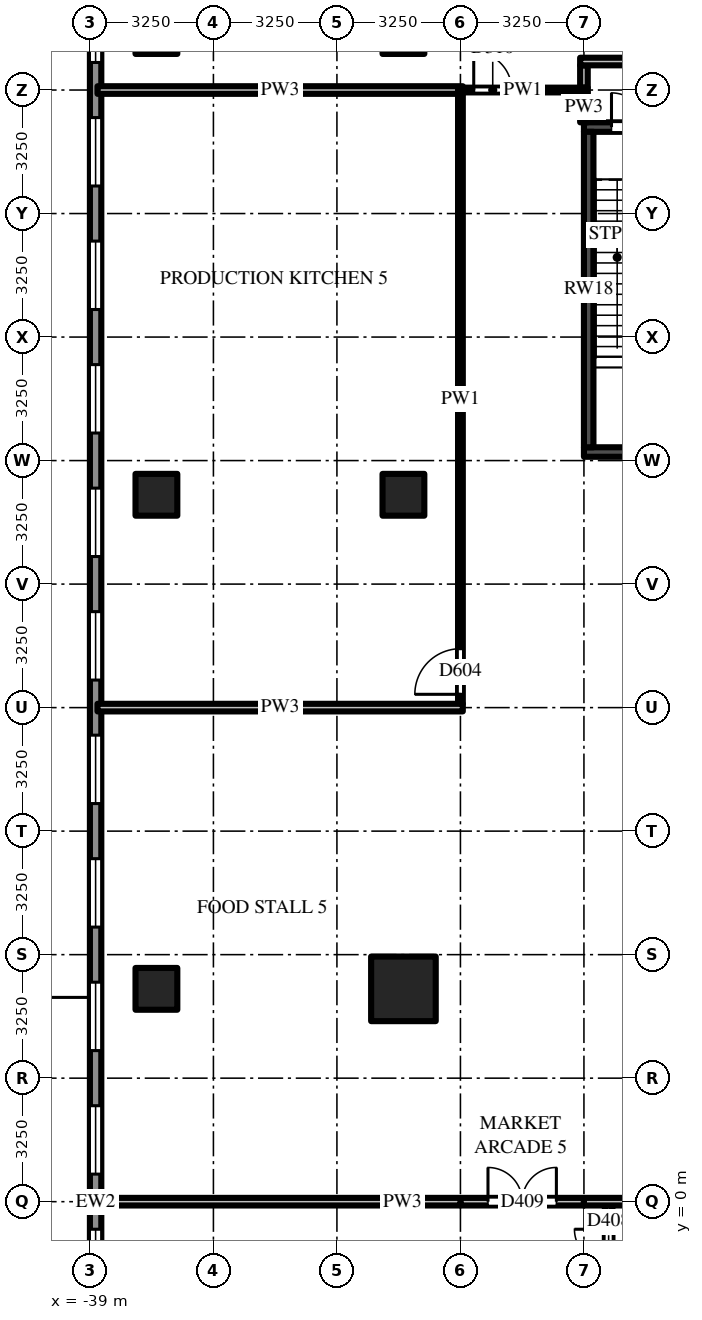
"""IFC4 building model, lengths in metres.
Left out: names, types, materials, properties, quantities, classifications, styles, units other than length and angle.
Written with IfcOpenShell. Run it as: python <this file> out.ifc"""

import sys

from ifc_helpers import new_model, si_unit, direction, frame, frame_2d, origin, origin_2d, place, context, subcontext, project, spatial, rectangle, extrude, source, transform, mapped, element, fill, save


model = new_model("IFC4")
c1 = context("Model", 3, precision=1e-05, world=origin(), true_north=direction((0.0, 1.0)))
c2 = subcontext(c1, "Body", "Model", "MODEL_VIEW")
j1 = project(units=[si_unit("LENGTHUNIT", "METRE"), si_unit("PLANEANGLEUNIT", "RADIAN")], contexts=[c1])
p1 = place(None, origin())
s1 = spatial("IfcSite", under=j1, at=p1, CompositionType="ELEMENT")
p2 = place(p1, origin())
s2 = spatial("IfcBuilding", under=s1, at=p2, CompositionType="ELEMENT")
p3 = place(p2, frame((0.0, 0.0, 14.0)))
s3 = spatial("IfcBuildingStorey", under=s2, at=p3, CompositionType="ELEMENT", Elevation=14.0)
m1 = source(origin(), c2, "Body", "SweptSolid", [
    extrude(rectangle(XDim=1.7, YDim=1.7, at=origin_2d()), origin(), (0.0, 0.0, 1.0), 5.0),
])
p4 = place(p3, frame((-30.75, 5.6, 0.0), z_axis=(0.0, 0.0, 1.0), x_axis=(1.0, 0.0, 0.0)))
e1 = element("IfcColumn", 1, at=p4, inside=s3, PredefinedType="COLUMN", context=c2, shape_type="MappedRepresentation", body=[
    mapped(m1, transform((0.0, 0.0, 0.0))),
])
m2 = source(origin(), c2, "Body", "SweptSolid", [
    extrude(rectangle(XDim=1.1, YDim=1.1, at=origin_2d()), origin(), (0.0, 0.0, 1.0), 5.0),
])
for number, where, z_axis, x_axis in (
    (2, (-30.75, 18.6, 0.0), (0.0, 0.0, 1.0), (1.0, 0.0, 0.0)),
    (3, (-30.75, 30.75, 0.0), (0.0, 0.0, 1.0), (1.0, 0.0, 0.0)),
    (4, (-37.25, 5.6, 0.0), (0.0, 0.0, 1.0), (1.0, 0.0, 0.0)),
    (5, (-37.25, 18.6, 0.0), (0.0, 0.0, 1.0), (1.0, 0.0, 0.0)),
    (6, (-37.25, 30.75, 0.0), (0.0, 0.0, 1.0), (1.0, 0.0, 0.0)),
):
    element("IfcColumn", number, at=place(p3, frame(where, z_axis=z_axis, x_axis=x_axis)), inside=s3, PredefinedType="COLUMN", context=c2, shape_type="MappedRepresentation", body=[
        mapped(m2, transform((0.0, 0.0, 0.0))),
    ])
m3 = source(origin(), c2, "Body", "SweptSolid", [
    extrude(rectangle(XDim=6.5, YDim=0.25, at=frame_2d((3.25, 0.0))), origin(), (0.0, 0.0, 1.0), 4.7),
])
p5 = place(p3, frame((-26.0, 28.275, 0.0), z_axis=(0.0, 0.0, 1.0), x_axis=(1.0, 0.0, 0.0)))
e7 = element("IfcWall", 7, at=p5, inside=s3, PredefinedType="SHEAR", context=c2, shape_type="MappedRepresentation", body=[
    mapped(m3, transform((0.0, 0.0, 0.0))),
])
m4 = source(origin(), c2, "Body", "SweptSolid", [
    extrude(rectangle(XDim=1.8, YDim=2.1, at=frame_2d((0.9, 1.05))), frame((0.0, 0.135, 0.0), z_axis=(0.0, -1.0, 0.0), x_axis=(1.0, 0.0, 0.0)), (0.0, 0.0, 1.0), 0.27),
])
p6 = place(p5, frame((0.725, 0.0, 0.0)))
e8 = element("IfcOpeningElement", 8, at=p6, cuts=e7, PredefinedType="OPENING", context=c2, shape_type="MappedRepresentation", body=[
    mapped(m4, transform((0.0, 0.0, 0.0))),
])
p7 = place(p5, frame((3.975, 0.0, 0.0)))
e9 = element("IfcOpeningElement", 9, at=p7, cuts=e7, PredefinedType="OPENING", context=c2, shape_type="MappedRepresentation", body=[
    mapped(m4, transform((0.0, 0.0, 0.0))),
])
p8 = place(p3, frame((-26.0, 19.725, 0.0), z_axis=(0.0, 0.0, 1.0), x_axis=(1.0, 0.0, 0.0)))
e10 = element("IfcWall", 10, at=p8, inside=s3, PredefinedType="SHEAR", context=c2, shape_type="MappedRepresentation", body=[
    mapped(m3, transform((0.0, 0.0, 0.0))),
])
m5 = source(origin(), c2, "Body", "SweptSolid", [
    extrude(rectangle(XDim=8.3, YDim=0.25, at=frame_2d((4.15, 0.0))), origin(), (0.0, 0.0, 1.0), 4.7),
])
p9 = place(p3, frame((-25.875, 19.85, 0.0), z_axis=(0.0, 0.0, 1.0), x_axis=(0.0, 1.0, 0.0)))
e11 = element("IfcWall", 11, at=p9, inside=s3, PredefinedType="SHEAR", context=c2, shape_type="MappedRepresentation", body=[
    mapped(m5, transform((0.0, 0.0, 0.0))),
])
m6 = source(origin(), c2, "Body", "SweptSolid", [
    extrude(rectangle(XDim=71.5, YDim=0.3, at=frame_2d((35.75, 0.0))), origin(), (0.0, 0.0, 1.0), 4.7),
])
p10 = place(p3, frame((-38.85, 35.75, 0.0), z_axis=(0.0, 0.0, 1.0), x_axis=(0.0, -1.0, 0.0)))
e12 = element("IfcWall", 12, at=p10, inside=s3, PredefinedType="SOLIDWALL", context=c2, shape_type="MappedRepresentation", body=[
    mapped(m6, transform((0.0, 0.0, 0.0))),
])
m7 = source(origin(), c2, "Body", "SweptSolid", [
    extrude(rectangle(XDim=1.8, YDim=3.0, at=frame_2d((0.9, 1.5))), frame((0.0, 0.16, 0.0), z_axis=(0.0, -1.0, 0.0), x_axis=(1.0, 0.0, 0.0)), (0.0, 0.0, 1.0), 0.32),
])
p11 = place(p10, frame((0.725, 0.0, 0.9)))
e13 = element("IfcOpeningElement", 13, at=p11, cuts=e12, PredefinedType="OPENING", context=c2, shape_type="MappedRepresentation", body=[
    mapped(m7, transform((0.0, 0.0, 0.0))),
])
p12 = place(p10, frame((3.975, 0.0, 0.9)))
e14 = element("IfcOpeningElement", 14, at=p12, cuts=e12, PredefinedType="OPENING", context=c2, shape_type="MappedRepresentation", body=[
    mapped(m7, transform((0.0, 0.0, 0.0))),
])
p13 = place(p10, frame((7.225, 0.0, 0.9)))
e15 = element("IfcOpeningElement", 15, at=p13, cuts=e12, PredefinedType="OPENING", context=c2, shape_type="MappedRepresentation", body=[
    mapped(m7, transform((0.0, 0.0, 0.0))),
])
p14 = place(p10, frame((10.475, 0.0, 0.9)))
e16 = element("IfcOpeningElement", 16, at=p14, cuts=e12, PredefinedType="OPENING", context=c2, shape_type="MappedRepresentation", body=[
    mapped(m7, transform((0.0, 0.0, 0.0))),
])
p15 = place(p10, frame((13.725, 0.0, 0.9)))
e17 = element("IfcOpeningElement", 17, at=p15, cuts=e12, PredefinedType="OPENING", context=c2, shape_type="MappedRepresentation", body=[
    mapped(m7, transform((0.0, 0.0, 0.0))),
])
p16 = place(p10, frame((16.975, 0.0, 0.9)))
e18 = element("IfcOpeningElement", 18, at=p16, cuts=e12, PredefinedType="OPENING", context=c2, shape_type="MappedRepresentation", body=[
    mapped(m7, transform((0.0, 0.0, 0.0))),
])
p17 = place(p10, frame((20.225, 0.0, 0.9)))
e19 = element("IfcOpeningElement", 19, at=p17, cuts=e12, PredefinedType="OPENING", context=c2, shape_type="MappedRepresentation", body=[
    mapped(m7, transform((0.0, 0.0, 0.0))),
])
p18 = place(p10, frame((23.475, 0.0, 0.9)))
e20 = element("IfcOpeningElement", 20, at=p18, cuts=e12, PredefinedType="OPENING", context=c2, shape_type="MappedRepresentation", body=[
    mapped(m7, transform((0.0, 0.0, 0.0))),
])
p19 = place(p10, frame((26.725, 0.0, 0.9)))
e21 = element("IfcOpeningElement", 21, at=p19, cuts=e12, PredefinedType="OPENING", context=c2, shape_type="MappedRepresentation", body=[
    mapped(m7, transform((0.0, 0.0, 0.0))),
])
p20 = place(p10, frame((29.975, 0.0, 0.9)))
e22 = element("IfcOpeningElement", 22, at=p20, cuts=e12, PredefinedType="OPENING", context=c2, shape_type="MappedRepresentation", body=[
    mapped(m7, transform((0.0, 0.0, 0.0))),
])
p21 = place(p10, frame((33.225, 0.0, 0.9)))
e23 = element("IfcOpeningElement", 23, at=p21, cuts=e12, PredefinedType="OPENING", context=c2, shape_type="MappedRepresentation", body=[
    mapped(m7, transform((0.0, 0.0, 0.0))),
])
p22 = place(p10, frame((36.475, 0.0, 0.9)))
e24 = element("IfcOpeningElement", 24, at=p22, cuts=e12, PredefinedType="OPENING", context=c2, shape_type="MappedRepresentation", body=[
    mapped(m7, transform((0.0, 0.0, 0.0))),
])
p23 = place(p10, frame((39.725, 0.0, 0.9)))
e25 = element("IfcOpeningElement", 25, at=p23, cuts=e12, PredefinedType="OPENING", context=c2, shape_type="MappedRepresentation", body=[
    mapped(m7, transform((0.0, 0.0, 0.0))),
])
p24 = place(p10, frame((42.975, 0.0, 0.9)))
e26 = element("IfcOpeningElement", 26, at=p24, cuts=e12, PredefinedType="OPENING", context=c2, shape_type="MappedRepresentation", body=[
    mapped(m7, transform((0.0, 0.0, 0.0))),
])
p25 = place(p10, frame((46.225, 0.0, 0.9)))
e27 = element("IfcOpeningElement", 27, at=p25, cuts=e12, PredefinedType="OPENING", context=c2, shape_type="MappedRepresentation", body=[
    mapped(m7, transform((0.0, 0.0, 0.0))),
])
m8 = source(origin(), c2, "Body", "SweptSolid", [
    extrude(rectangle(XDim=1.8, YDim=2.4, at=frame_2d((0.9, 1.2))), frame((0.0, 0.16, 0.0), z_axis=(0.0, -1.0, 0.0), x_axis=(1.0, 0.0, 0.0)), (0.0, 0.0, 1.0), 0.32),
])
p26 = place(p10, frame((49.475, 0.0, 0.0)))
e28 = element("IfcOpeningElement", 28, at=p26, cuts=e12, PredefinedType="OPENING", context=c2, shape_type="MappedRepresentation", body=[
    mapped(m8, transform((0.0, 0.0, 0.0))),
])
p27 = place(p10, frame((52.725, 0.0, 0.9)))
e29 = element("IfcOpeningElement", 29, at=p27, cuts=e12, PredefinedType="OPENING", context=c2, shape_type="MappedRepresentation", body=[
    mapped(m7, transform((0.0, 0.0, 0.0))),
])
p28 = place(p10, frame((55.975, 0.0, 0.9)))
e30 = element("IfcOpeningElement", 30, at=p28, cuts=e12, PredefinedType="OPENING", context=c2, shape_type="MappedRepresentation", body=[
    mapped(m7, transform((0.0, 0.0, 0.0))),
])
p29 = place(p10, frame((59.225, 0.0, 0.9)))
e31 = element("IfcOpeningElement", 31, at=p29, cuts=e12, PredefinedType="OPENING", context=c2, shape_type="MappedRepresentation", body=[
    mapped(m7, transform((0.0, 0.0, 0.0))),
])
p30 = place(p10, frame((62.475, 0.0, 0.9)))
e32 = element("IfcOpeningElement", 32, at=p30, cuts=e12, PredefinedType="OPENING", context=c2, shape_type="MappedRepresentation", body=[
    mapped(m7, transform((0.0, 0.0, 0.0))),
])
p31 = place(p10, frame((65.725, 0.0, 0.9)))
e33 = element("IfcOpeningElement", 33, at=p31, cuts=e12, PredefinedType="OPENING", context=c2, shape_type="MappedRepresentation", body=[
    mapped(m7, transform((0.0, 0.0, 0.0))),
])
p32 = place(p10, frame((68.975, 0.0, 0.9)))
e34 = element("IfcOpeningElement", 34, at=p32, cuts=e12, PredefinedType="OPENING", context=c2, shape_type="MappedRepresentation", body=[
    mapped(m7, transform((0.0, 0.0, 0.0))),
])
p33 = place(p3, frame((-29.25, 13.1, 0.0), z_axis=(0.0, 0.0, 1.0), x_axis=(0.0, 1.0, 0.0)))
e35 = element("IfcWall", 35, at=p33, inside=s3, PredefinedType="PARTITIONING", context=c2, shape_type="SweptSolid", body=[
    extrude(rectangle(XDim=16.05, YDim=0.125, at=frame_2d((8.025, 0.0))), origin(), (0.0, 0.0, 1.0), 3.762),
])
m9 = source(origin(), c2, "Body", "SweptSolid", [
    extrude(rectangle(XDim=1.2, YDim=2.1, at=frame_2d((0.6, 1.05))), frame((0.0, 0.073, 0.0), z_axis=(0.0, -1.0, 0.0), x_axis=(1.0, 0.0, 0.0)), (0.0, 0.0, 1.0), 0.145),
])
p34 = place(p33, frame((0.25, 0.0, 0.0)))
e36 = element("IfcOpeningElement", 36, at=p34, cuts=e35, PredefinedType="OPENING", context=c2, shape_type="MappedRepresentation", body=[
    mapped(m9, transform((0.0, 0.0, 0.0))),
])
m10 = source(origin(), c2, "Body", "SweptSolid", [
    extrude(rectangle(XDim=0.788, YDim=0.2, at=frame_2d((0.394, 0.0))), origin(), (0.0, 0.0, 1.0), 4.7),
])
p35 = place(p3, frame((-26.0, 28.4, 0.0), z_axis=(0.0, 0.0, 1.0), x_axis=(0.0, 1.0, 0.0)))
e37 = element("IfcWall", 37, at=p35, inside=s3, PredefinedType="PARTITIONING", context=c2, shape_type="MappedRepresentation", body=[
    mapped(m10, transform((0.0, 0.0, 0.0))),
])
m11 = source(origin(), c2, "Body", "SweptSolid", [
    extrude(rectangle(XDim=0.587, YDim=0.2, at=frame_2d((0.294, 0.0))), origin(), (0.0, 0.0, 1.0), 4.7),
])
p36 = place(p3, frame((-26.0, 29.312, 0.0), z_axis=(0.0, 0.0, 1.0), x_axis=(0.0, 1.0, 0.0)))
e38 = element("IfcWall", 38, at=p36, inside=s3, PredefinedType="PARTITIONING", context=c2, shape_type="MappedRepresentation", body=[
    mapped(m11, transform((0.0, 0.0, 0.0))),
])
m12 = source(origin(), c2, "Body", "SweptSolid", [
    extrude(rectangle(XDim=3.05, YDim=0.2, at=frame_2d((1.525, 0.0))), origin(), (0.0, 0.0, 1.0), 4.077),
])
p37 = place(p3, frame((-25.35, -3.15, 0.0), z_axis=(0.0, 0.0, 1.0), x_axis=(0.0, 1.0, 0.0)))
e39 = element("IfcWall", 39, at=p37, inside=s3, PredefinedType="PARTITIONING", context=c2, shape_type="MappedRepresentation", body=[
    mapped(m12, transform((0.0, 0.0, 0.0))),
])
m13 = source(origin(), c2, "Body", "SweptSolid", [
    extrude(rectangle(XDim=1.8, YDim=2.1, at=frame_2d((0.9, 1.05))), frame((0.0, 0.11, 0.0), z_axis=(0.0, -1.0, 0.0), x_axis=(1.0, 0.0, 0.0)), (0.0, 0.0, 1.0), 0.22),
])
p38 = place(p37, frame((0.625, 0.0, 0.0)))
e40 = element("IfcOpeningElement", 40, at=p38, cuts=e39, PredefinedType="OPENING", context=c2, shape_type="MappedRepresentation", body=[
    mapped(m13, transform((0.0, 0.0, 0.0))),
])
m14 = source(origin(), c2, "Body", "SweptSolid", [
    extrude(rectangle(XDim=3.25, YDim=0.2, at=frame_2d((1.625, 0.0))), origin(), (0.0, 0.0, 1.0), 4.077),
])
p39 = place(p3, frame((-29.25, 0.0, 0.0), z_axis=(0.0, 0.0, 1.0), x_axis=(1.0, 0.0, 0.0)))
e41 = element("IfcWall", 41, at=p39, inside=s3, PredefinedType="PARTITIONING", context=c2, shape_type="MappedRepresentation", body=[
    mapped(m14, transform((0.0, 0.0, 0.0))),
])
p40 = place(p39, frame((0.725, 0.0, 0.0)))
e42 = element("IfcOpeningElement", 42, at=p40, cuts=e41, PredefinedType="OPENING", context=c2, shape_type="MappedRepresentation", body=[
    mapped(m13, transform((0.0, 0.0, 0.0))),
])
m15 = source(origin(), c2, "Body", "SweptSolid", [
    extrude(rectangle(XDim=9.55, YDim=0.2, at=frame_2d((4.775, 0.0))), origin(), (0.0, 0.0, 1.0), 3.918),
])
p41 = place(p3, frame((-38.8, 0.0, 0.0), z_axis=(0.0, 0.0, 1.0), x_axis=(1.0, 0.0, 0.0)))
e43 = element("IfcWall", 43, at=p41, inside=s3, PredefinedType="PARTITIONING", context=c2, shape_type="MappedRepresentation", body=[
    mapped(m15, transform((0.0, 0.0, 0.0))),
])
m16 = source(origin(), c2, "Body", "SweptSolid", [
    extrude(rectangle(XDim=2.0, YDim=0.2, at=frame_2d((1.0, 0.0))), origin(), (0.0, 0.0, 1.0), 4.077),
])
p42 = place(p3, frame((-26.0, 0.0, 0.0), z_axis=(0.0, 0.0, 1.0), x_axis=(1.0, 0.0, 0.0)))
e44 = element("IfcWall", 44, at=p42, inside=s3, PredefinedType="PARTITIONING", context=c2, shape_type="MappedRepresentation", body=[
    mapped(m16, transform((0.0, 0.0, 0.0))),
])
m17 = source(origin(), c2, "Body", "SweptSolid", [
    extrude(rectangle(XDim=9.613, YDim=0.2, at=frame_2d((4.806, 0.0))), origin(), (0.0, 0.0, 1.0), 3.762),
])
for number, where, z_axis, x_axis in (
    (45, (-38.8, 13.0, 0.0), (0.0, 0.0, 1.0), (1.0, 0.0, 0.0)),
    (46, (-38.8, 29.25, 0.0), (0.0, 0.0, 1.0), (1.0, 0.0, 0.0)),
):
    element("IfcWall", number, at=place(p3, frame(where, z_axis=z_axis, x_axis=x_axis)), inside=s3, PredefinedType="PARTITIONING", context=c2, shape_type="MappedRepresentation", body=[
        mapped(m17, transform((0.0, 0.0, 0.0))),
    ])
m18 = source(origin(), c2, "Body", "SweptSolid", [
    extrude(rectangle(XDim=3.413, YDim=0.125, at=frame_2d((1.706, 0.0))), origin(), (0.0, 0.0, 1.0), 4.7),
])
p43 = place(p3, frame((-29.312, 29.25, 0.0), z_axis=(0.0, 0.0, 1.0), x_axis=(1.0, 0.0, 0.0)))
e47 = element("IfcWall", 47, at=p43, inside=s3, PredefinedType="PARTITIONING", context=c2, shape_type="MappedRepresentation", body=[
    mapped(m18, transform((0.0, 0.0, 0.0))),
])
m19 = source(origin(), c2, "Body", "SweptSolid", [
    extrude(rectangle(XDim=1.0, YDim=2.1, at=frame_2d((0.5, 1.05))), frame((0.0, 0.073, 0.0), z_axis=(0.0, -1.0, 0.0), x_axis=(1.0, 0.0, 0.0)), (0.0, 0.0, 1.0), 0.145),
])
p44 = place(p43, frame((0.413, 0.0, 0.0)))
e48 = element("IfcOpeningElement", 48, at=p44, cuts=e47, PredefinedType="OPENING", context=c2, shape_type="MappedRepresentation", body=[
    mapped(m19, transform((0.0, 0.0, 0.0))),
])
m20 = source(origin(), c2, "Body", "SweptSolid", [
    extrude(rectangle(XDim=8.2, YDim=0.2, at=frame_2d((4.1, 0.0))), origin(), (0.0, 0.0, 1.0), 3.762),
])
p45 = place(p3, frame((-26.1, 30.0, 0.0), z_axis=(0.0, 0.0, 1.0), x_axis=(1.0, 0.0, 0.0)))
e49 = element("IfcWall", 49, at=p45, inside=s3, PredefinedType="PARTITIONING", context=c2, shape_type="MappedRepresentation", body=[
    mapped(m20, transform((0.0, 0.0, 0.0))),
])
m21 = source(origin(), c2, "Body", "SweptSolid", [
    extrude(rectangle(XDim=1.8, YDim=2.1, at=frame_2d((0.9, 1.05))), frame((0.0, 0.025, 0.0), z_axis=(0.0, -1.0, 0.0), x_axis=(1.0, 0.0, 0.0)), (0.0, 0.0, 1.0), 0.05),
])
p46 = place(p6, origin())
e50 = element("IfcDoor", 50, at=p46, inside=s3, OperationType="DOUBLE_DOOR_SINGLE_SWING", PredefinedType="DOOR", context=c2, shape_type="MappedRepresentation", body=[
    mapped(m21, transform((0.0, 0.0, 0.0))),
])
fill(e8, e50)
m22 = source(origin(), c2, "Body", "SweptSolid", [
    extrude(rectangle(XDim=1.8, YDim=3.0, at=frame_2d((0.9, 1.5))), frame((0.0, 0.03, 0.0), z_axis=(0.0, -1.0, 0.0), x_axis=(1.0, 0.0, 0.0)), (0.0, 0.0, 1.0), 0.06),
])
p47 = place(p12, origin())
e51 = element("IfcWindow", 51, at=p47, inside=s3, PartitioningType="SINGLE_PANEL", PredefinedType="WINDOW", context=c2, shape_type="MappedRepresentation", body=[
    mapped(m22, transform((0.0, 0.0, 0.0))),
])
fill(e14, e51)
p48 = place(p13, origin())
e52 = element("IfcWindow", 52, at=p48, inside=s3, PartitioningType="SINGLE_PANEL", PredefinedType="WINDOW", context=c2, shape_type="MappedRepresentation", body=[
    mapped(m22, transform((0.0, 0.0, 0.0))),
])
fill(e15, e52)
p49 = place(p14, origin())
e53 = element("IfcWindow", 53, at=p49, inside=s3, PartitioningType="SINGLE_PANEL", PredefinedType="WINDOW", context=c2, shape_type="MappedRepresentation", body=[
    mapped(m22, transform((0.0, 0.0, 0.0))),
])
fill(e16, e53)
p50 = place(p15, origin())
e54 = element("IfcWindow", 54, at=p50, inside=s3, PartitioningType="SINGLE_PANEL", PredefinedType="WINDOW", context=c2, shape_type="MappedRepresentation", body=[
    mapped(m22, transform((0.0, 0.0, 0.0))),
])
fill(e17, e54)
p51 = place(p16, origin())
e55 = element("IfcWindow", 55, at=p51, inside=s3, PartitioningType="SINGLE_PANEL", PredefinedType="WINDOW", context=c2, shape_type="MappedRepresentation", body=[
    mapped(m22, transform((0.0, 0.0, 0.0))),
])
fill(e18, e55)
p52 = place(p17, origin())
e56 = element("IfcWindow", 56, at=p52, inside=s3, PartitioningType="SINGLE_PANEL", PredefinedType="WINDOW", context=c2, shape_type="MappedRepresentation", body=[
    mapped(m22, transform((0.0, 0.0, 0.0))),
])
fill(e19, e56)
p53 = place(p18, origin())
e57 = element("IfcWindow", 57, at=p53, inside=s3, PartitioningType="SINGLE_PANEL", PredefinedType="WINDOW", context=c2, shape_type="MappedRepresentation", body=[
    mapped(m22, transform((0.0, 0.0, 0.0))),
])
fill(e20, e57)
p54 = place(p19, origin())
e58 = element("IfcWindow", 58, at=p54, inside=s3, PartitioningType="SINGLE_PANEL", PredefinedType="WINDOW", context=c2, shape_type="MappedRepresentation", body=[
    mapped(m22, transform((0.0, 0.0, 0.0))),
])
fill(e21, e58)
p55 = place(p20, origin())
e59 = element("IfcWindow", 59, at=p55, inside=s3, PartitioningType="SINGLE_PANEL", PredefinedType="WINDOW", context=c2, shape_type="MappedRepresentation", body=[
    mapped(m22, transform((0.0, 0.0, 0.0))),
])
fill(e22, e59)
p56 = place(p21, origin())
e60 = element("IfcWindow", 60, at=p56, inside=s3, PartitioningType="SINGLE_PANEL", PredefinedType="WINDOW", context=c2, shape_type="MappedRepresentation", body=[
    mapped(m22, transform((0.0, 0.0, 0.0))),
])
fill(e23, e60)
p57 = place(p22, origin())
e61 = element("IfcWindow", 61, at=p57, inside=s3, PartitioningType="SINGLE_PANEL", PredefinedType="WINDOW", context=c2, shape_type="MappedRepresentation", body=[
    mapped(m22, transform((0.0, 0.0, 0.0))),
])
fill(e24, e61)
p58 = place(p38, origin())
e62 = element("IfcDoor", 62, at=p58, inside=s3, OperationType="DOUBLE_DOOR_SINGLE_SWING", PredefinedType="DOOR", context=c2, shape_type="MappedRepresentation", body=[
    mapped(m21, transform((0.0, 0.0, 0.0))),
])
fill(e40, e62)
p59 = place(p40, origin())
e63 = element("IfcDoor", 63, at=p59, inside=s3, OperationType="DOUBLE_DOOR_SINGLE_SWING", PredefinedType="DOOR", context=c2, shape_type="MappedRepresentation", body=[
    mapped(m21, transform((0.0, 0.0, 0.0))),
])
fill(e42, e63)
m23 = source(origin(), c2, "Body", "SweptSolid", [
    extrude(rectangle(XDim=1.2, YDim=2.1, at=frame_2d((0.6, 1.05))), frame((0.0, 0.025, 0.0), z_axis=(0.0, -1.0, 0.0), x_axis=(1.0, 0.0, 0.0)), (0.0, 0.0, 1.0), 0.05),
])
p60 = place(p34, origin())
e64 = element("IfcDoor", 64, at=p60, inside=s3, OperationType="SINGLE_SWING_LEFT", PredefinedType="DOOR", context=c2, shape_type="MappedRepresentation", body=[
    mapped(m23, transform((0.0, 0.0, 0.0))),
])
fill(e36, e64)
m24 = source(origin(), c2, "Body", "SweptSolid", [
    extrude(rectangle(XDim=1.0, YDim=2.1, at=frame_2d((0.5, 1.05))), frame((0.0, 0.025, 0.0), z_axis=(0.0, -1.0, 0.0), x_axis=(1.0, 0.0, 0.0)), (0.0, 0.0, 1.0), 0.05),
])
p61 = place(p44, origin())
e65 = element("IfcDoor", 65, at=p61, inside=s3, OperationType="SINGLE_SWING_LEFT", PredefinedType="DOOR", context=c2, shape_type="MappedRepresentation", body=[
    mapped(m24, transform((0.0, 0.0, 0.0))),
])
fill(e48, e65)
save(model, sys.argv[1])
